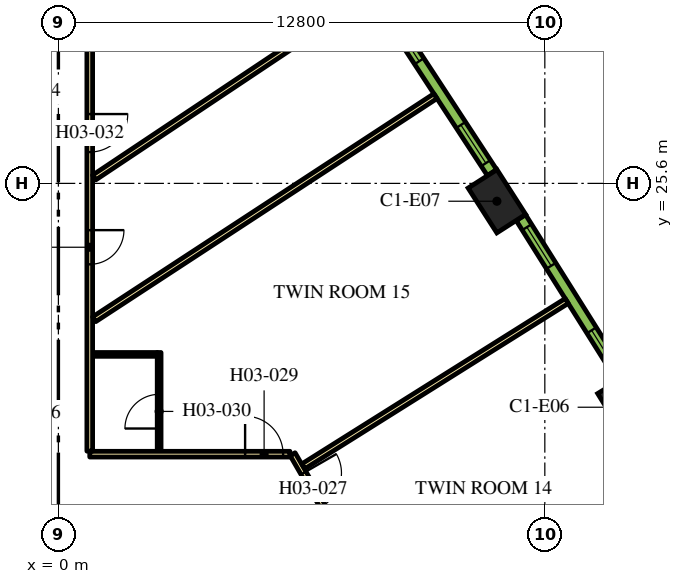
"""IFC4 building model, lengths in metres.
Left out: names, types, materials, properties, quantities, classifications, styles, units other than length and angle.
Written with IfcOpenShell. Run it as: python <this file> out.ifc"""

import sys

from ifc_helpers import new_model, si_unit, direction, frame, frame_2d, origin, origin_2d, place, context, subcontext, project, spatial, rectangle, extrude, element, fill, save


model = new_model("IFC4")
c1 = context("Model", 3, precision=1e-05, world=origin(), true_north=direction((0.0, 1.0)))
c2 = subcontext(c1, "Body", "Model", "MODEL_VIEW")
j1 = project(units=[si_unit("LENGTHUNIT", "METRE"), si_unit("PLANEANGLEUNIT", "RADIAN")], contexts=[c1])
p1 = place(None, origin())
s1 = spatial("IfcSite", under=j1, at=p1, CompositionType="ELEMENT")
p2 = place(p1, origin())
s2 = spatial("IfcBuilding", under=s1, at=p2, CompositionType="ELEMENT")
p3 = place(p2, frame((0.0, 0.0, 58.8)))
s3 = spatial("IfcBuildingStorey", under=s2, at=p3, CompositionType="ELEMENT", Elevation=58.8)
for number, where, z_axis, x_axis in (
    (1, (14.942, 19.71, 0.0), (0.0, 0.0, 1.0), (-0.524, 0.852, 0.0)),
    (2, (11.539, 25.131, 0.0), (0.0, 0.0, 1.0), (-0.539, 0.842, 0.0)),
):
    element("IfcColumn", number, at=place(p3, frame(where, z_axis=z_axis, x_axis=x_axis)), inside=s3, PredefinedType="COLUMN", context=c2, shape_type="SweptSolid", body=[
        extrude(rectangle(XDim=1.4, YDim=0.9, at=origin_2d()), origin(), (0.0, 0.0, 1.0), 3.9),
    ])
p4 = place(p3, frame((6.163, 18.475, 0.0), z_axis=(0.0, 0.0, 1.0), x_axis=(0.500001317485, -0.866024643133, 0.0)))
e3 = element("IfcWall", 3, at=p4, inside=s3, PredefinedType="PARTITIONING", context=c2, shape_type="SweptSolid", body=[
    extrude(rectangle(XDim=25.767, YDim=0.15, at=frame_2d((12.883, 0.0))), origin(), (0.0, 0.0, 1.0), 2.75),
])
p5 = place(p4, frame((24.586, 0.0, 0.0)))
e4 = element("IfcOpeningElement", 4, at=p5, cuts=e3, PredefinedType="OPENING", context=c2, shape_type="SweptSolid", body=[
    extrude(rectangle(XDim=1.0, YDim=2.1, at=frame_2d((0.5, 1.05))), frame((0.0, 0.085, 0.0), z_axis=(0.0, -1.0, 0.0), x_axis=(1.0, 0.0, 0.0)), (0.0, 0.0, 1.0), 0.17),
])
p6 = place(p4, frame((13.144, 0.0, 0.0)))
e5 = element("IfcOpeningElement", 5, at=p6, cuts=e3, PredefinedType="OPENING", context=c2, shape_type="SweptSolid", body=[
    extrude(rectangle(XDim=1.0, YDim=2.1, at=frame_2d((0.5, 1.05))), frame((0.0, 0.085, 0.0), z_axis=(0.0, -1.0, 0.0), x_axis=(1.0, 0.0, 0.0)), (0.0, 0.0, 1.0), 0.17),
])
p7 = place(p4, frame((11.692, 0.0, 0.0)))
e6 = element("IfcOpeningElement", 6, at=p7, cuts=e3, PredefinedType="OPENING", context=c2, shape_type="SweptSolid", body=[
    extrude(rectangle(XDim=1.0, YDim=2.1, at=frame_2d((0.5, 1.05))), frame((0.0, 0.085, 0.0), z_axis=(0.0, -1.0, 0.0), x_axis=(1.0, 0.0, 0.0)), (0.0, 0.0, 1.0), 0.17),
])
p8 = place(p4, frame((0.572, 0.0, 0.0)))
e7 = element("IfcOpeningElement", 7, at=p8, cuts=e3, PredefinedType="OPENING", context=c2, shape_type="SweptSolid", body=[
    extrude(rectangle(XDim=1.0, YDim=2.1, at=frame_2d((0.5, 1.05))), frame((0.0, 0.085, 0.0), z_axis=(0.0, -1.0, 0.0), x_axis=(1.0, 0.0, 0.0)), (0.0, 0.0, 1.0), 0.17),
])
p9 = place(p3, frame((0.825, 18.475, 0.0), z_axis=(0.0, 0.0, 1.0), x_axis=(1.0, 0.0, 0.0)))
e8 = element("IfcWall", 8, at=p9, inside=s3, PredefinedType="PARTITIONING", context=c2, shape_type="SweptSolid", body=[
    extrude(rectangle(XDim=5.268, YDim=0.15, at=frame_2d((2.634, 0.0))), origin(), (0.0, 0.0, 1.0), 2.75),
])
p10 = place(p9, frame((4.088, 0.0, 0.0)))
e9 = element("IfcOpeningElement", 9, at=p10, cuts=e8, PredefinedType="OPENING", context=c2, shape_type="SweptSolid", body=[
    extrude(rectangle(XDim=1.0, YDim=2.1, at=frame_2d((0.5, 1.05))), frame((0.0, 0.085, 0.0), z_axis=(0.0, -1.0, 0.0), x_axis=(1.0, 0.0, 0.0)), (0.0, 0.0, 1.0), 0.17),
])
p11 = place(p3, frame((0.825, 34.699, 0.0), z_axis=(0.0, 0.0, 1.0), x_axis=(0.0, -1.0, 0.0)))
e10 = element("IfcWall", 10, at=p11, inside=s3, PredefinedType="PARTITIONING", context=c2, shape_type="SweptSolid", body=[
    extrude(rectangle(XDim=16.144, YDim=0.15, at=frame_2d((8.072, 0.0))), origin(), (0.0, 0.0, 1.0), 2.75),
])
p12 = place(p11, frame((10.329, 0.0, 0.0)))
e11 = element("IfcOpeningElement", 11, at=p12, cuts=e10, PredefinedType="OPENING", context=c2, shape_type="SweptSolid", body=[
    extrude(rectangle(XDim=0.9, YDim=2.1, at=frame_2d((0.45, 1.05))), frame((0.0, 0.085, 0.0), z_axis=(0.0, -1.0, 0.0), x_axis=(1.0, 0.0, 0.0)), (0.0, 0.0, 1.0), 0.17),
])
p13 = place(p11, frame((7.275, 0.0, 0.0)))
e12 = element("IfcOpeningElement", 12, at=p13, cuts=e10, PredefinedType="OPENING", context=c2, shape_type="SweptSolid", body=[
    extrude(rectangle(XDim=1.0, YDim=2.1, at=frame_2d((0.5, 1.05))), frame((0.0, 0.085, 0.0), z_axis=(0.0, -1.0, 0.0), x_axis=(1.0, 0.0, 0.0)), (0.0, 0.0, 1.0), 0.17),
])
p14 = place(p3, frame((9.922, 27.896, 0.0), z_axis=(0.0, 0.0, 1.0), x_axis=(-0.836970816595, -0.547247523675, 0.0)))
e13 = element("IfcWall", 13, at=p14, inside=s3, PredefinedType="PARTITIONING", context=c2, shape_type="SweptSolid", body=[
    extrude(rectangle(XDim=10.729, YDim=0.15, at=frame_2d((5.364, 0.0))), origin(), (0.0, 0.0, 1.0), 2.75),
])
p15 = place(p3, frame((7.662, 30.238, 0.0), z_axis=(0.0, 0.0, 1.0), x_axis=(-0.831882886825, -0.554951225431, 0.0)))
e14 = element("IfcWall", 14, at=p15, inside=s3, PredefinedType="PARTITIONING", context=c2, shape_type="SweptSolid", body=[
    extrude(rectangle(XDim=8.079, YDim=0.15, at=frame_2d((4.04, 0.0))), origin(), (0.0, 0.0, 1.0), 2.75),
])
p16 = place(p3, frame((13.376, 22.506, 0.0), z_axis=(0.0, 0.0, 1.0), x_axis=(-0.846945608893, -0.531679542183, 0.0)))
e15 = element("IfcWall", 15, at=p16, inside=s3, PredefinedType="PARTITIONING", context=c2, shape_type="SweptSolid", body=[
    extrude(rectangle(XDim=8.182, YDim=0.15, at=frame_2d((4.091, 0.0))), origin(), (0.0, 0.0, 1.0), 2.75),
])
p17 = place(p3, frame((2.651, 18.55, 0.0), z_axis=(0.0, 0.0, 1.0), x_axis=(0.0, 1.0, 0.0)))
e16 = element("IfcWall", 16, at=p17, inside=s3, PredefinedType="PARTITIONING", context=c2, shape_type="SweptSolid", body=[
    extrude(rectangle(XDim=2.6, YDim=0.1, at=frame_2d((1.3, 0.0))), origin(), (0.0, 0.0, 1.0), 2.75),
])
p18 = place(p17, frame((0.6, 0.0, 0.0)))
e17 = element("IfcOpeningElement", 17, at=p18, cuts=e16, PredefinedType="OPENING", context=c2, shape_type="SweptSolid", body=[
    extrude(rectangle(XDim=0.9, YDim=2.1, at=frame_2d((0.45, 1.05))), frame((0.0, 0.06, 0.0), z_axis=(0.0, -1.0, 0.0), x_axis=(1.0, 0.0, 0.0)), (0.0, 0.0, 1.0), 0.12),
])
p19 = place(p3, frame((2.601, 21.1, 0.0), z_axis=(0.0, 0.0, 1.0), x_axis=(-1.0, 0.0, 0.0)))
e18 = element("IfcWall", 18, at=p19, inside=s3, PredefinedType="PARTITIONING", context=c2, shape_type="SweptSolid", body=[
    extrude(rectangle(XDim=1.7, YDim=0.1, at=frame_2d((0.85, 0.0))), origin(), (0.0, 0.0, 1.0), 2.75),
])
p20 = place(p3, frame((14.827, 20.466, 0.0), z_axis=(0.0, 0.0, 1.0), x_axis=(-0.531688286542, 0.846940119462, 0.0)))
e19 = element("IfcWall", 19, at=p20, inside=s3, PredefinedType="SOLIDWALL", context=c2, shape_type="SweptSolid", body=[
    extrude(rectangle(XDim=4.998, YDim=0.29, at=frame_2d((2.499, 0.0))), origin(), (0.0, 0.0, 1.0), 3.65),
])
p21 = place(p20, frame((0.297, 0.0, 0.9)))
e20 = element("IfcOpeningElement", 20, at=p21, cuts=e19, PredefinedType="OPENING", context=c2, shape_type="SweptSolid", body=[
    extrude(rectangle(XDim=1.2, YDim=2.15, at=frame_2d((0.6, 1.075))), frame((0.0, 0.155, 0.0), z_axis=(0.0, -1.0, 0.0), x_axis=(1.0, 0.0, 0.0)), (0.0, 0.0, 1.0), 0.31),
])
p22 = place(p20, frame((3.501, 0.0, 0.9)))
e21 = element("IfcOpeningElement", 21, at=p22, cuts=e19, PredefinedType="OPENING", context=c2, shape_type="SweptSolid", body=[
    extrude(rectangle(XDim=1.2, YDim=2.15, at=frame_2d((0.6, 1.075))), frame((0.0, 0.155, 0.0), z_axis=(0.0, -1.0, 0.0), x_axis=(1.0, 0.0, 0.0)), (0.0, 0.0, 1.0), 0.31),
])
p23 = place(p3, frame((11.411, 25.884, 0.0), z_axis=(0.0, 0.0, 1.0), x_axis=(-0.547204617628, 0.836998868845, 0.0)))
e22 = element("IfcWall", 22, at=p23, inside=s3, PredefinedType="SOLIDWALL", context=c2, shape_type="SweptSolid", body=[
    extrude(rectangle(XDim=4.998, YDim=0.29, at=frame_2d((2.499, 0.0))), origin(), (0.0, 0.0, 1.0), 3.65),
])
p24 = place(p23, frame((0.297, 0.0, 0.9)))
e23 = element("IfcOpeningElement", 23, at=p24, cuts=e22, PredefinedType="OPENING", context=c2, shape_type="SweptSolid", body=[
    extrude(rectangle(XDim=1.2, YDim=2.15, at=frame_2d((0.6, 1.075))), frame((0.0, 0.155, 0.0), z_axis=(0.0, -1.0, 0.0), x_axis=(1.0, 0.0, 0.0)), (0.0, 0.0, 1.0), 0.31),
])
p25 = place(p23, frame((3.501, 0.0, 0.9)))
e24 = element("IfcOpeningElement", 24, at=p25, cuts=e22, PredefinedType="OPENING", context=c2, shape_type="SweptSolid", body=[
    extrude(rectangle(XDim=1.2, YDim=2.15, at=frame_2d((0.6, 1.075))), frame((0.0, 0.155, 0.0), z_axis=(0.0, -1.0, 0.0), x_axis=(1.0, 0.0, 0.0)), (0.0, 0.0, 1.0), 0.31),
])
p26 = place(p8, origin())
e25 = element("IfcDoor", 25, at=p26, inside=s3, OperationType="SINGLE_SWING_LEFT", PredefinedType="DOOR", context=c2, shape_type="SweptSolid", body=[
    extrude(rectangle(XDim=1.0, YDim=2.1, at=frame_2d((0.5, 1.05))), frame((0.0, 0.025, 0.0), z_axis=(0.0, -1.0, 0.0), x_axis=(1.0, 0.0, 0.0)), (0.0, 0.0, 1.0), 0.05),
])
fill(e7, e25)
p27 = place(p10, origin())
e26 = element("IfcDoor", 26, at=p27, inside=s3, OperationType="SINGLE_SWING_RIGHT", PredefinedType="DOOR", context=c2, shape_type="SweptSolid", body=[
    extrude(rectangle(XDim=1.0, YDim=2.1, at=frame_2d((0.5, 1.05))), frame((0.0, 0.025, 0.0), z_axis=(0.0, -1.0, 0.0), x_axis=(1.0, 0.0, 0.0)), (0.0, 0.0, 1.0), 0.05),
])
fill(e9, e26)
p28 = place(p18, origin())
e27 = element("IfcDoor", 27, at=p28, inside=s3, OperationType="SINGLE_SWING_RIGHT", PredefinedType="DOOR", context=c2, shape_type="SweptSolid", body=[
    extrude(rectangle(XDim=0.9, YDim=2.1, at=frame_2d((0.45, 1.05))), frame((0.0, 0.025, 0.0), z_axis=(0.0, -1.0, 0.0), x_axis=(1.0, 0.0, 0.0)), (0.0, 0.0, 1.0), 0.05),
])
fill(e17, e27)
p29 = place(p12, origin())
e28 = element("IfcDoor", 28, at=p29, inside=s3, OperationType="SINGLE_SWING_RIGHT", PredefinedType="DOOR", context=c2, shape_type="SweptSolid", body=[
    extrude(rectangle(XDim=0.9, YDim=2.1, at=frame_2d((0.45, 1.05))), frame((0.0, 0.025, 0.0), z_axis=(0.0, -1.0, 0.0), x_axis=(1.0, 0.0, 0.0)), (0.0, 0.0, 1.0), 0.05),
])
fill(e11, e28)
p30 = place(p13, origin())
e29 = element("IfcDoor", 29, at=p30, inside=s3, OperationType="SINGLE_SWING_RIGHT", PredefinedType="DOOR", context=c2, shape_type="SweptSolid", body=[
    extrude(rectangle(XDim=1.0, YDim=2.1, at=frame_2d((0.5, 1.05))), frame((0.0, 0.025, 0.0), z_axis=(0.0, -1.0, 0.0), x_axis=(1.0, 0.0, 0.0)), (0.0, 0.0, 1.0), 0.05),
])
fill(e12, e29)
p31 = place(p21, origin())
e30 = element("IfcWindow", 30, at=p31, inside=s3, PartitioningType="DOUBLE_PANEL_VERTICAL", PredefinedType="WINDOW", context=c2, shape_type="SweptSolid", body=[
    extrude(rectangle(XDim=1.2, YDim=2.15, at=frame_2d((0.6, 1.075))), frame((0.0, 0.015, 0.0), z_axis=(0.0, -1.0, 0.0), x_axis=(1.0, 0.0, 0.0)), (0.0, 0.0, 1.0), 0.06),
])
fill(e20, e30)
p32 = place(p22, origin())
e31 = element("IfcWindow", 31, at=p32, inside=s3, PartitioningType="DOUBLE_PANEL_VERTICAL", PredefinedType="WINDOW", context=c2, shape_type="SweptSolid", body=[
    extrude(rectangle(XDim=1.2, YDim=2.15, at=frame_2d((0.6, 1.075))), frame((0.0, 0.015, 0.0), z_axis=(0.0, -1.0, 0.0), x_axis=(1.0, 0.0, 0.0)), (0.0, 0.0, 1.0), 0.06),
])
fill(e21, e31)
p33 = place(p24, origin())
e32 = element("IfcWindow", 32, at=p33, inside=s3, PartitioningType="DOUBLE_PANEL_VERTICAL", PredefinedType="WINDOW", context=c2, shape_type="SweptSolid", body=[
    extrude(rectangle(XDim=1.2, YDim=2.15, at=frame_2d((0.6, 1.075))), frame((0.0, 0.015, 0.0), z_axis=(0.0, -1.0, 0.0), x_axis=(1.0, 0.0, 0.0)), (0.0, 0.0, 1.0), 0.06),
])
fill(e23, e32)
p34 = place(p25, origin())
e33 = element("IfcWindow", 33, at=p34, inside=s3, PartitioningType="DOUBLE_PANEL_VERTICAL", PredefinedType="WINDOW", context=c2, shape_type="SweptSolid", body=[
    extrude(rectangle(XDim=1.2, YDim=2.15, at=frame_2d((0.6, 1.075))), frame((0.0, 0.015, 0.0), z_axis=(0.0, -1.0, 0.0), x_axis=(1.0, 0.0, 0.0)), (0.0, 0.0, 1.0), 0.06),
])
fill(e24, e33)
save(model, sys.argv[1])
